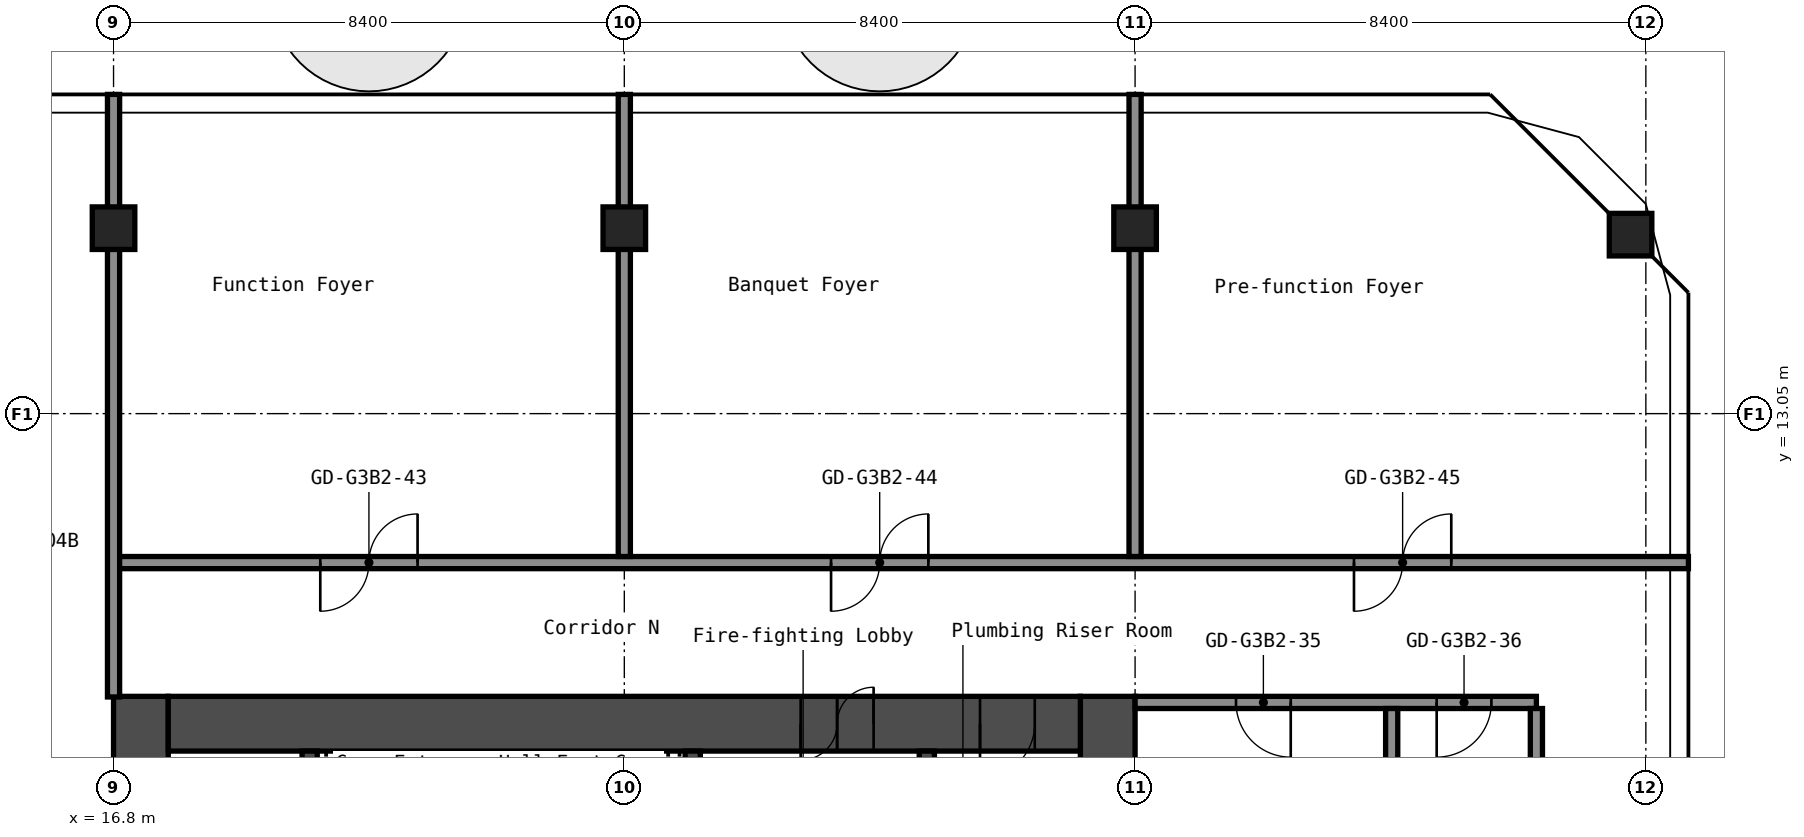
"""IFC4 building model, lengths in metres.
Left out: names, types, materials, properties, quantities, classifications, styles, units other than length and angle.
Written with IfcOpenShell. Run it as: python <this file> out.ifc"""

import sys

from ifc_helpers import new_model, si_unit, direction, frame, frame_2d, origin, origin_2d, place, context, subcontext, project, spatial, rectangle, hollow_rectangle, extrude, element, fill, save


model = new_model("IFC4")
c1 = context("Model", 3, precision=1e-05, world=origin(), true_north=direction((0.0, 1.0)))
c2 = subcontext(c1, "Body", "Model", "MODEL_VIEW")
j1 = project(units=[si_unit("LENGTHUNIT", "METRE"), si_unit("PLANEANGLEUNIT", "RADIAN")], contexts=[c1])
p1 = place(None, origin())
s1 = spatial("IfcSite", under=j1, at=p1, CompositionType="ELEMENT")
p2 = place(p1, origin())
s2 = spatial("IfcBuilding", under=s1, at=p2, CompositionType="ELEMENT")
p3 = place(p2, frame((0.0, 0.0, 166.2)))
s3 = spatial("IfcBuildingStorey", under=s2, at=p3, CompositionType="ELEMENT", Elevation=166.2)
for number, where, z_axis, x_axis in (
    (1, (16.8, 16.1, 0.0), (0.0, 0.0, 1.0), (1.0, 0.0, 0.0)),
    (2, (25.2, 16.1, 0.0), (0.0, 0.0, 1.0), (1.0, 0.0, 0.0)),
    (3, (33.6, 16.1, 0.0), (0.0, 0.0, 1.0), (1.0, 0.0, 0.0)),
    (4, (41.749, 15.994, 0.0), (0.0, 0.0, 1.0), (1.0, 0.0, 0.0)),
):
    element("IfcColumn", number, at=place(p3, frame(where, z_axis=z_axis, x_axis=x_axis)), inside=s3, PredefinedType="COLUMN", context=c2, shape_type="SweptSolid", body=[
        extrude(hollow_rectangle(XDim=0.7, YDim=0.7, WallThickness=0.028, at=origin_2d()), origin(), (0.0, 0.0, 1.0), 2.75),
    ])
p4 = place(p3, frame((17.25, -8.4, 0.0), z_axis=(0.0, 0.0, 1.0), x_axis=(0.0, 1.0, 0.0)))
e5 = element("IfcWall", 5, at=p4, inside=s3, PredefinedType="SHEAR", context=c2, shape_type="SweptSolid", body=[
    extrude(rectangle(XDim=16.8, YDim=0.9, at=frame_2d((8.4, 0.0))), origin(), (0.0, 0.0, 1.0), 2.75),
])
p5 = place(p4, frame((7.1, 0.0, 0.0)))
e6 = element("IfcOpeningElement", 6, at=p5, cuts=e5, PredefinedType="OPENING", context=c2, shape_type="SweptSolid", body=[
    extrude(rectangle(XDim=1.6, YDim=2.1, at=frame_2d((0.8, 1.05))), frame((0.0, 0.46, 0.0), z_axis=(0.0, -1.0, 0.0), x_axis=(1.0, 0.0, 0.0)), (0.0, 0.0, 1.0), 0.92),
])
p6 = place(p3, frame((33.15, -8.4, 0.0), z_axis=(0.0, 0.0, 1.0), x_axis=(0.0, 1.0, 0.0)))
e7 = element("IfcWall", 7, at=p6, inside=s3, PredefinedType="SHEAR", context=c2, shape_type="SweptSolid", body=[
    extrude(rectangle(XDim=16.8, YDim=0.9, at=frame_2d((8.4, 0.0))), origin(), (0.0, 0.0, 1.0), 2.75),
])
p7 = place(p3, frame((17.7, 7.95, 0.0), z_axis=(0.0, 0.0, 1.0), x_axis=(1.0, 0.0, 0.0)))
e8 = element("IfcWall", 8, at=p7, inside=s3, PredefinedType="SHEAR", context=c2, shape_type="SweptSolid", body=[
    extrude(rectangle(XDim=15.0, YDim=0.9, at=frame_2d((7.5, 0.0))), origin(), (0.0, 0.0, 1.0), 2.75),
])
p8 = place(p7, frame((10.4, 0.0, 0.0)))
e9 = element("IfcOpeningElement", 9, at=p8, cuts=e8, PredefinedType="OPENING", context=c2, shape_type="SweptSolid", body=[
    extrude(rectangle(XDim=1.2, YDim=2.1, at=frame_2d((0.6, 1.05))), frame((0.0, 0.46, 0.0), z_axis=(0.0, -1.0, 0.0), x_axis=(1.0, 0.0, 0.0)), (0.0, 0.0, 1.0), 0.92),
])
p9 = place(p7, frame((13.35, 0.0, 0.0)))
e10 = element("IfcOpeningElement", 10, at=p9, cuts=e8, PredefinedType="OPENING", context=c2, shape_type="SweptSolid", body=[
    extrude(rectangle(XDim=0.9, YDim=2.1, at=frame_2d((0.45, 1.05))), frame((0.0, 0.46, 0.0), z_axis=(0.0, -1.0, 0.0), x_axis=(1.0, 0.0, 0.0)), (0.0, 0.0, 1.0), 0.92),
])
p10 = place(p3, frame((20.025, 1.2, 0.0), z_axis=(0.0, 0.0, 1.0), x_axis=(0.0, 1.0, 0.0)))
e11 = element("IfcWall", 11, at=p10, inside=s3, PredefinedType="SHEAR", context=c2, shape_type="SweptSolid", body=[
    extrude(rectangle(XDim=6.3, YDim=0.25, at=frame_2d((3.15, 0.0))), origin(), (0.0, 0.0, 1.0), 2.75),
])
p11 = place(p3, frame((26.325, 3.75, 0.0), z_axis=(0.0, 0.0, 1.0), x_axis=(0.0, 1.0, 0.0)))
e12 = element("IfcWall", 12, at=p11, inside=s3, PredefinedType="SHEAR", context=c2, shape_type="SweptSolid", body=[
    extrude(rectangle(XDim=3.75, YDim=0.25, at=frame_2d((1.875, 0.0))), origin(), (0.0, 0.0, 1.0), 2.75),
])
p12 = place(p11, frame((1.25, 0.0, 0.0)))
e13 = element("IfcOpeningElement", 13, at=p12, cuts=e12, PredefinedType="OPENING", context=c2, shape_type="SweptSolid", body=[
    extrude(rectangle(XDim=1.2, YDim=2.1, at=frame_2d((0.6, 1.05))), frame((0.0, 0.135, 0.0), z_axis=(0.0, -1.0, 0.0), x_axis=(1.0, 0.0, 0.0)), (0.0, 0.0, 1.0), 0.27),
])
p13 = place(p3, frame((30.175, 1.45, 0.0), z_axis=(0.0, 0.0, 1.0), x_axis=(0.0, 1.0, 0.0)))
e14 = element("IfcWall", 14, at=p13, inside=s3, PredefinedType="SHEAR", context=c2, shape_type="SweptSolid", body=[
    extrude(rectangle(XDim=6.05, YDim=0.25, at=frame_2d((3.025, 0.0))), origin(), (0.0, 0.0, 1.0), 2.75),
])
p14 = place(p13, frame((2.625, 0.0, 0.0)))
e15 = element("IfcOpeningElement", 15, at=p14, cuts=e14, PredefinedType="OPENING", context=c2, shape_type="SweptSolid", body=[
    extrude(rectangle(XDim=1.1, YDim=2.1, at=frame_2d((0.55, 1.05))), frame((0.0, 0.135, 0.0), z_axis=(0.0, -1.0, 0.0), x_axis=(1.0, 0.0, 0.0)), (0.0, 0.0, 1.0), 0.27),
])
p15 = place(p3, frame((33.6, 8.3, 0.0), z_axis=(0.0, 0.0, 1.0), x_axis=(1.0, 0.0, 0.0)))
e16 = element("IfcWall", 16, at=p15, inside=s3, PredefinedType="PARTITIONING", context=c2, shape_type="SweptSolid", body=[
    extrude(rectangle(XDim=6.6, YDim=0.2, at=frame_2d((3.3, 0.0))), origin(), (0.0, 0.0, 1.0), 2.75),
])
p16 = place(p15, frame((1.66, 0.0, 0.0)))
e17 = element("IfcOpeningElement", 17, at=p16, cuts=e16, PredefinedType="OPENING", context=c2, shape_type="SweptSolid", body=[
    extrude(rectangle(XDim=0.9, YDim=2.1, at=frame_2d((0.45, 1.05))), frame((0.0, 0.11, 0.0), z_axis=(0.0, -1.0, 0.0), x_axis=(1.0, 0.0, 0.0)), (0.0, 0.0, 1.0), 0.22),
])
p17 = place(p15, frame((4.96, 0.0, 0.0)))
e18 = element("IfcOpeningElement", 18, at=p17, cuts=e16, PredefinedType="OPENING", context=c2, shape_type="SweptSolid", body=[
    extrude(rectangle(XDim=0.9, YDim=2.1, at=frame_2d((0.45, 1.05))), frame((0.0, 0.11, 0.0), z_axis=(0.0, -1.0, 0.0), x_axis=(1.0, 0.0, 0.0)), (0.0, 0.0, 1.0), 0.22),
])
p18 = place(p3, frame((16.8, 10.6, 0.0), z_axis=(0.0, 0.0, 1.0), x_axis=(1.0, 0.0, 0.0)))
e19 = element("IfcWall", 19, at=p18, inside=s3, PredefinedType="PARTITIONING", context=c2, shape_type="SweptSolid", body=[
    extrude(rectangle(XDim=25.9, YDim=0.2, at=frame_2d((12.95, 0.0))), origin(), (0.0, 0.0, 1.0), 2.75),
])
p19 = place(p18, frame((3.4, 0.0, 0.0)))
e20 = element("IfcOpeningElement", 20, at=p19, cuts=e19, PredefinedType="OPENING", context=c2, shape_type="SweptSolid", body=[
    extrude(rectangle(XDim=1.6, YDim=2.1, at=frame_2d((0.8, 1.05))), frame((0.0, 0.11, 0.0), z_axis=(0.0, -1.0, 0.0), x_axis=(1.0, 0.0, 0.0)), (0.0, 0.0, 1.0), 0.22),
])
p20 = place(p18, frame((11.8, 0.0, 0.0)))
e21 = element("IfcOpeningElement", 21, at=p20, cuts=e19, PredefinedType="OPENING", context=c2, shape_type="SweptSolid", body=[
    extrude(rectangle(XDim=1.6, YDim=2.1, at=frame_2d((0.8, 1.05))), frame((0.0, 0.11, 0.0), z_axis=(0.0, -1.0, 0.0), x_axis=(1.0, 0.0, 0.0)), (0.0, 0.0, 1.0), 0.22),
])
p21 = place(p18, frame((20.4, 0.0, 0.0)))
e22 = element("IfcOpeningElement", 22, at=p21, cuts=e19, PredefinedType="OPENING", context=c2, shape_type="SweptSolid", body=[
    extrude(rectangle(XDim=1.6, YDim=2.1, at=frame_2d((0.8, 1.05))), frame((0.0, 0.11, 0.0), z_axis=(0.0, -1.0, 0.0), x_axis=(1.0, 0.0, 0.0)), (0.0, 0.0, 1.0), 0.22),
])
p22 = place(p3, frame((16.8, 8.39, 0.0), z_axis=(0.0, 0.0, 1.0), x_axis=(0.0, 1.0, 0.0)))
e23 = element("IfcWall", 23, at=p22, inside=s3, PredefinedType="PARTITIONING", context=c2, shape_type="SweptSolid", body=[
    extrude(rectangle(XDim=9.91, YDim=0.2, at=frame_2d((4.955, 0.0))), origin(), (0.0, 0.0, 1.0), 2.75),
])
for number, where, z_axis, x_axis in (
    (24, (25.2, 10.7, 0.0), (0.0, 0.0, 1.0), (0.0, 1.0, 0.0)),
    (25, (33.6, 10.7, 0.0), (0.0, 0.0, 1.0), (0.0, 1.0, 0.0)),
):
    element("IfcWall", number, at=place(p3, frame(where, z_axis=z_axis, x_axis=x_axis)), inside=s3, PredefinedType="PARTITIONING", context=c2, shape_type="SweptSolid", body=[
        extrude(rectangle(XDim=7.6, YDim=0.2, at=frame_2d((3.8, 0.0))), origin(), (0.0, 0.0, 1.0), 2.75),
    ])
p23 = place(p3, frame((37.82, 0.0, 0.0), z_axis=(0.0, 0.0, 1.0), x_axis=(0.0, 1.0, 0.0)))
e26 = element("IfcWall", 26, at=p23, inside=s3, PredefinedType="PARTITIONING", context=c2, shape_type="SweptSolid", body=[
    extrude(rectangle(XDim=8.2, YDim=0.2, at=frame_2d((4.1, 0.0))), origin(), (0.0, 0.0, 1.0), 2.75),
])
p24 = place(p3, frame((40.2, -8.2, 0.0), z_axis=(0.0, 0.0, 1.0), x_axis=(0.0, 1.0, 0.0)))
e27 = element("IfcWall", 27, at=p24, inside=s3, PredefinedType="PARTITIONING", context=c2, shape_type="SweptSolid", body=[
    extrude(rectangle(XDim=16.4, YDim=0.2, at=frame_2d((8.2, 0.0))), origin(), (0.0, 0.0, 1.0), 2.75),
])
p25 = place(p8, origin())
e28 = element("IfcDoor", 28, at=p25, inside=s3, OperationType="DOUBLE_DOOR_SINGLE_SWING", PredefinedType="DOOR", context=c2, shape_type="SweptSolid", body=[
    extrude(rectangle(XDim=1.2, YDim=2.1, at=frame_2d((0.6, 1.05))), frame((0.0, 0.025, 0.0), z_axis=(0.0, -1.0, 0.0), x_axis=(1.0, 0.0, 0.0)), (0.0, 0.0, 1.0), 0.05),
])
fill(e9, e28)
p26 = place(p9, origin())
e29 = element("IfcDoor", 29, at=p26, inside=s3, OperationType="SINGLE_SWING_LEFT", PredefinedType="DOOR", context=c2, shape_type="SweptSolid", body=[
    extrude(rectangle(XDim=0.9, YDim=2.1, at=frame_2d((0.45, 1.05))), frame((0.0, 0.025, 0.0), z_axis=(0.0, -1.0, 0.0), x_axis=(1.0, 0.0, 0.0)), (0.0, 0.0, 1.0), 0.05),
])
fill(e10, e29)
p27 = place(p16, origin())
e30 = element("IfcDoor", 30, at=p27, inside=s3, OperationType="SINGLE_SWING_RIGHT", PredefinedType="DOOR", context=c2, shape_type="SweptSolid", body=[
    extrude(rectangle(XDim=0.9, YDim=2.1, at=frame_2d((0.45, 1.05))), frame((0.0, 0.025, 0.0), z_axis=(0.0, -1.0, 0.0), x_axis=(1.0, 0.0, 0.0)), (0.0, 0.0, 1.0), 0.05),
])
fill(e17, e30)
p28 = place(p17, origin())
e31 = element("IfcDoor", 31, at=p28, inside=s3, OperationType="SINGLE_SWING_LEFT", PredefinedType="DOOR", context=c2, shape_type="SweptSolid", body=[
    extrude(rectangle(XDim=0.9, YDim=2.1, at=frame_2d((0.45, 1.05))), frame((0.0, 0.025, 0.0), z_axis=(0.0, -1.0, 0.0), x_axis=(1.0, 0.0, 0.0)), (0.0, 0.0, 1.0), 0.05),
])
fill(e18, e31)
p29 = place(p19, origin())
e32 = element("IfcDoor", 32, at=p29, inside=s3, OperationType="DOUBLE_DOOR_SINGLE_SWING", PredefinedType="DOOR", context=c2, shape_type="SweptSolid", body=[
    extrude(rectangle(XDim=1.6, YDim=2.1, at=frame_2d((0.8, 1.05))), frame((0.0, 0.025, 0.0), z_axis=(0.0, -1.0, 0.0), x_axis=(1.0, 0.0, 0.0)), (0.0, 0.0, 1.0), 0.05),
])
fill(e20, e32)
p30 = place(p20, origin())
e33 = element("IfcDoor", 33, at=p30, inside=s3, OperationType="DOUBLE_DOOR_SINGLE_SWING", PredefinedType="DOOR", context=c2, shape_type="SweptSolid", body=[
    extrude(rectangle(XDim=1.6, YDim=2.1, at=frame_2d((0.8, 1.05))), frame((0.0, 0.025, 0.0), z_axis=(0.0, -1.0, 0.0), x_axis=(1.0, 0.0, 0.0)), (0.0, 0.0, 1.0), 0.05),
])
fill(e21, e33)
p31 = place(p21, origin())
e34 = element("IfcDoor", 34, at=p31, inside=s3, OperationType="DOUBLE_DOOR_SINGLE_SWING", PredefinedType="DOOR", context=c2, shape_type="SweptSolid", body=[
    extrude(rectangle(XDim=1.6, YDim=2.1, at=frame_2d((0.8, 1.05))), frame((0.0, 0.025, 0.0), z_axis=(0.0, -1.0, 0.0), x_axis=(1.0, 0.0, 0.0)), (0.0, 0.0, 1.0), 0.05),
])
fill(e22, e34)
save(model, sys.argv[1])
